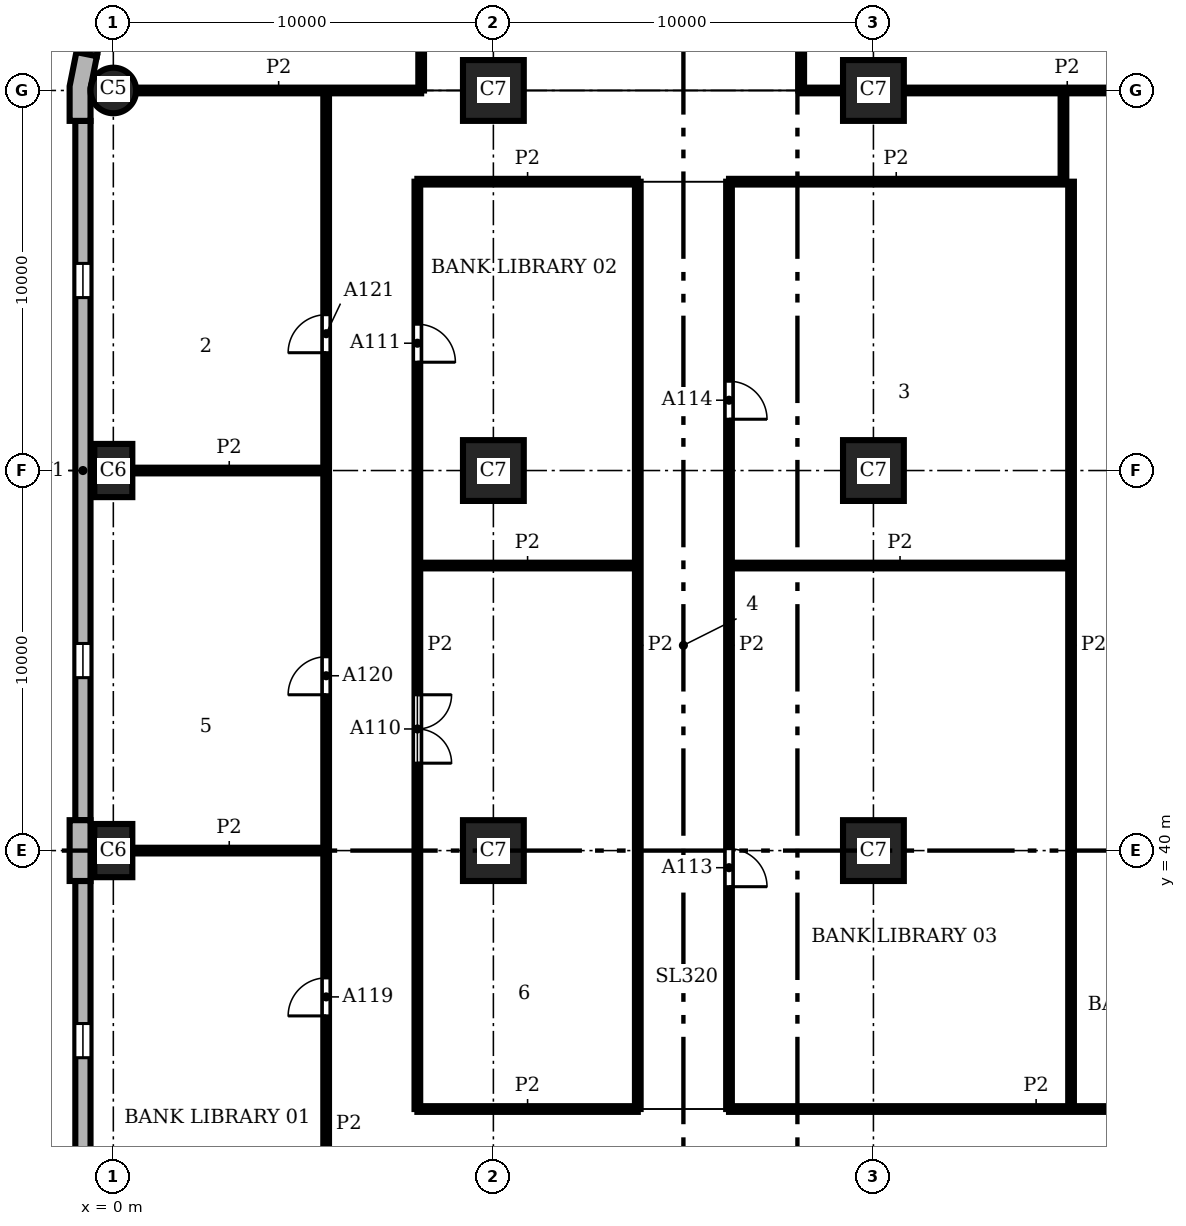
"""IFC4 building model, lengths in metres.
Left out: names, types, materials, properties, quantities, classifications, styles, units other than length and angle.
Written with IfcOpenShell. Run it as: python <this file> out.ifc"""

import sys

from ifc_helpers import new_model, si_unit, direction, frame, frame_2d, origin, origin_2d, place, context, subcontext, project, spatial, polyline, rectangle, circle, outline, extrude, element, fill, save


model = new_model("IFC4")
c1 = context("Model", 3, precision=1e-05, world=origin(), true_north=direction((0.0, 1.0)))
c2 = subcontext(c1, "Body", "Model", "MODEL_VIEW")
j1 = project(units=[si_unit("LENGTHUNIT", "METRE"), si_unit("PLANEANGLEUNIT", "RADIAN")], contexts=[c1])
p1 = place(None, origin())
s1 = spatial("IfcSite", under=j1, at=p1, CompositionType="ELEMENT")
p2 = place(p1, origin())
s2 = spatial("IfcBuilding", under=s1, at=p2, CompositionType="ELEMENT")
p3 = place(p2, frame((0.0, 0.0, 12.0)))
s3 = spatial("IfcBuildingStorey", under=s2, at=p3, CompositionType="ELEMENT", Elevation=12.0)
p4 = place(p3, frame((0.0, 60.0, 0.0), z_axis=(0.0, 0.0, 1.0), x_axis=(1.0, 0.0, 0.0)))
e1 = element("IfcColumn", 1, at=p4, inside=s3, PredefinedType="COLUMN", context=c2, shape_type="SweptSolid", body=[
    extrude(circle(Radius=0.6, at=origin_2d()), origin(), (0.0, 0.0, 1.0), 3.9),
])
for number, where, z_axis, x_axis in (
    (2, (0.0, 50.0, 0.0), (0.0, 0.0, 1.0), (0.0, 1.0, 0.0)),
    (3, (0.0, 40.0, 0.0), (0.0, 0.0, 1.0), (0.0, 1.0, 0.0)),
):
    element("IfcColumn", number, at=place(p3, frame(where, z_axis=z_axis, x_axis=x_axis)), inside=s3, PredefinedType="COLUMN", context=c2, shape_type="SweptSolid", body=[
        extrude(rectangle(XDim=1.4, YDim=1.0, at=origin_2d()), origin(), (0.0, 0.0, 1.0), 3.9),
    ])
for number, where, z_axis, x_axis in (
    (4, (10.0, 40.0, 0.0), (0.0, 0.0, 1.0), (1.0, 0.0, 0.0)),
    (5, (10.0, 50.0, 0.0), (0.0, 0.0, 1.0), (1.0, 0.0, 0.0)),
    (6, (10.0, 60.0, 0.0), (0.0, 0.0, 1.0), (1.0, 0.0, 0.0)),
    (7, (20.0, 40.0, 0.0), (0.0, 0.0, 1.0), (1.0, 0.0, 0.0)),
    (8, (20.0, 50.0, 0.0), (0.0, 0.0, 1.0), (1.0, 0.0, 0.0)),
    (9, (20.0, 60.0, 0.0), (0.0, 0.0, 1.0), (1.0, 0.0, 0.0)),
):
    element("IfcColumn", number, at=place(p3, frame(where, z_axis=z_axis, x_axis=x_axis)), inside=s3, PredefinedType="COLUMN", context=c2, shape_type="SweptSolid", body=[
        extrude(rectangle(XDim=1.6, YDim=1.6, at=origin_2d()), origin(), (0.0, 0.0, 1.0), 3.9),
    ])
p5 = place(p3, origin())
e10 = element("IfcWall", 10, at=p5, inside=s3, PredefinedType="SOLIDWALL", context=c2, shape_type="SweptSolid", body=[
    extrude(outline(polyline([(-0.825, 60.98), (-0.972, 61.009), (-1.15, 60.113), (-1.15, 59.2), (-1.0, 59.2), (-0.6, 59.2), (-0.6, 60.059), (-0.432, 60.902), (-0.825, 60.98)])), origin(), (0.0, 0.0, 1.0), 3.9),
])
e11 = element("IfcWall", 11, at=p5, inside=s3, PredefinedType="SOLIDWALL", context=c2, shape_type="SweptSolid", body=[
    extrude(outline(polyline([(-1.0, 40.8), (-1.15, 40.8), (-1.15, 40.0), (-1.15, 39.2), (-1.0, 39.2), (-0.6, 39.2), (-0.6, 40.0), (-0.6, 40.8), (-1.0, 40.8)])), origin(), (0.0, 0.0, 1.0), 3.9),
])
p6 = place(p3, frame((0.299, 65.602, 0.0), z_axis=(0.0, 0.0, 1.0), x_axis=(-0.195098533057, -0.98078364709, 0.0)))
e12 = element("IfcWall", 12, at=p6, inside=s3, PredefinedType="SOLIDWALL", context=c2, shape_type="SweptSolid", body=[
    extrude(rectangle(XDim=4.753, YDim=0.4, at=frame_2d((2.376, 0.0))), origin(), (0.0, 0.0, 1.0), 3.9),
])
p7 = place(p6, frame((0.226, 0.0, 0.9)))
e13 = element("IfcOpeningElement", 13, at=p7, cuts=e12, PredefinedType="OPENING", context=c2, shape_type="SweptSolid", body=[
    extrude(rectangle(XDim=4.3, YDim=2.35, at=frame_2d((2.15, 1.175))), frame((0.0, 0.21, 0.0), z_axis=(0.0, -1.0, 0.0), x_axis=(1.0, 0.0, 0.0)), (0.0, 0.0, 1.0), 0.42),
])
p8 = place(p3, frame((-0.8, 59.2, 0.0), z_axis=(0.0, 0.0, 1.0), x_axis=(0.0, -1.0, 0.0)))
e14 = element("IfcWall", 14, at=p8, inside=s3, PredefinedType="SOLIDWALL", context=c2, shape_type="SweptSolid", body=[
    extrude(rectangle(XDim=18.4, YDim=0.4, at=frame_2d((9.2, 0.0))), origin(), (0.0, 0.0, 1.0), 3.9),
])
p9 = place(p8, frame((3.75, 0.0, 0.9)))
e15 = element("IfcOpeningElement", 15, at=p9, cuts=e14, PredefinedType="OPENING", context=c2, shape_type="SweptSolid", body=[
    extrude(rectangle(XDim=0.9, YDim=2.35, at=frame_2d((0.45, 1.175))), frame((0.0, 0.21, 0.0), z_axis=(0.0, -1.0, 0.0), x_axis=(1.0, 0.0, 0.0)), (0.0, 0.0, 1.0), 0.42),
])
p10 = place(p8, frame((13.75, 0.0, 0.9)))
e16 = element("IfcOpeningElement", 16, at=p10, cuts=e14, PredefinedType="OPENING", context=c2, shape_type="SweptSolid", body=[
    extrude(rectangle(XDim=0.9, YDim=2.35, at=frame_2d((0.45, 1.175))), frame((0.0, 0.21, 0.0), z_axis=(0.0, -1.0, 0.0), x_axis=(1.0, 0.0, 0.0)), (0.0, 0.0, 1.0), 0.42),
])
p11 = place(p3, frame((-0.8, 39.2, 0.0), z_axis=(0.0, 0.0, 1.0), x_axis=(0.0, -1.0, 0.0)))
e17 = element("IfcWall", 17, at=p11, inside=s3, PredefinedType="SOLIDWALL", context=c2, shape_type="SweptSolid", body=[
    extrude(rectangle(XDim=18.4, YDim=0.4, at=frame_2d((9.2, 0.0))), origin(), (0.0, 0.0, 1.0), 3.9),
])
p12 = place(p11, frame((3.75, 0.0, 0.9)))
e18 = element("IfcOpeningElement", 18, at=p12, cuts=e17, PredefinedType="OPENING", context=c2, shape_type="SweptSolid", body=[
    extrude(rectangle(XDim=0.9, YDim=2.35, at=frame_2d((0.45, 1.175))), frame((0.0, 0.21, 0.0), z_axis=(0.0, -1.0, 0.0), x_axis=(1.0, 0.0, 0.0)), (0.0, 0.0, 1.0), 0.42),
])
p13 = place(p11, frame((13.75, 0.0, 0.9)))
e19 = element("IfcOpeningElement", 19, at=p13, cuts=e17, PredefinedType="OPENING", context=c2, shape_type="SweptSolid", body=[
    extrude(rectangle(XDim=0.9, YDim=2.35, at=frame_2d((0.45, 1.175))), frame((0.0, 0.21, 0.0), z_axis=(0.0, -1.0, 0.0), x_axis=(1.0, 0.0, 0.0)), (0.0, 0.0, 1.0), 0.42),
])
p14 = place(p3, frame((5.6, 5.6, 0.0), z_axis=(0.0, 0.0, 1.0), x_axis=(0.0, 1.0, 0.0)))
e20 = element("IfcWall", 20, at=p14, inside=s3, PredefinedType="PARTITIONING", context=c2, shape_type="SweptSolid", body=[
    extrude(rectangle(XDim=54.4, YDim=0.15, at=frame_2d((27.2, 0.0))), origin(), (0.0, 0.0, 1.0), 3.58),
])
p15 = place(p14, frame((6.25, 0.0, 0.0)))
e21 = element("IfcOpeningElement", 21, at=p15, cuts=e20, PredefinedType="OPENING", context=c2, shape_type="SweptSolid", body=[
    extrude(rectangle(XDim=0.8, YDim=2.1, at=frame_2d((0.4, 1.05))), frame((0.0, 0.085, 0.0), z_axis=(0.0, -1.0, 0.0), x_axis=(1.0, 0.0, 0.0)), (0.0, 0.0, 1.0), 0.17),
])
p16 = place(p14, frame((11.25, 0.0, 0.0)))
e22 = element("IfcOpeningElement", 22, at=p16, cuts=e20, PredefinedType="OPENING", context=c2, shape_type="SweptSolid", body=[
    extrude(rectangle(XDim=1.1, YDim=2.1, at=frame_2d((0.55, 1.05))), frame((0.0, 0.085, 0.0), z_axis=(0.0, -1.0, 0.0), x_axis=(1.0, 0.0, 0.0)), (0.0, 0.0, 1.0), 0.17),
])
p17 = place(p14, frame((20.0, 0.0, 0.0)))
e23 = element("IfcOpeningElement", 23, at=p17, cuts=e20, PredefinedType="OPENING", context=c2, shape_type="SweptSolid", body=[
    extrude(rectangle(XDim=1.0, YDim=2.1, at=frame_2d((0.5, 1.05))), frame((0.0, 0.085, 0.0), z_axis=(0.0, -1.0, 0.0), x_axis=(1.0, 0.0, 0.0)), (0.0, 0.0, 1.0), 0.17),
])
p18 = place(p14, frame((30.05, 0.0, 0.0)))
e24 = element("IfcOpeningElement", 24, at=p18, cuts=e20, PredefinedType="OPENING", context=c2, shape_type="SweptSolid", body=[
    extrude(rectangle(XDim=1.0, YDim=2.1, at=frame_2d((0.5, 1.05))), frame((0.0, 0.085, 0.0), z_axis=(0.0, -1.0, 0.0), x_axis=(1.0, 0.0, 0.0)), (0.0, 0.0, 1.0), 0.17),
])
p19 = place(p14, frame((38.5, 0.0, 0.0)))
e25 = element("IfcOpeningElement", 25, at=p19, cuts=e20, PredefinedType="OPENING", context=c2, shape_type="SweptSolid", body=[
    extrude(rectangle(XDim=1.0, YDim=2.1, at=frame_2d((0.5, 1.05))), frame((0.0, 0.085, 0.0), z_axis=(0.0, -1.0, 0.0), x_axis=(1.0, 0.0, 0.0)), (0.0, 0.0, 1.0), 0.17),
])
p20 = place(p14, frame((47.5, 0.0, 0.0)))
e26 = element("IfcOpeningElement", 26, at=p20, cuts=e20, PredefinedType="OPENING", context=c2, shape_type="SweptSolid", body=[
    extrude(rectangle(XDim=1.0, YDim=2.1, at=frame_2d((0.5, 1.05))), frame((0.0, 0.085, 0.0), z_axis=(0.0, -1.0, 0.0), x_axis=(1.0, 0.0, 0.0)), (0.0, 0.0, 1.0), 0.17),
])
p21 = place(p3, frame((8.0, 33.2, 0.0), z_axis=(0.0, 0.0, 1.0), x_axis=(0.0, 1.0, 0.0)))
e27 = element("IfcWall", 27, at=p21, inside=s3, PredefinedType="PARTITIONING", context=c2, shape_type="SweptSolid", body=[
    extrude(rectangle(XDim=24.4, YDim=0.15, at=frame_2d((12.2, 0.0))), origin(), (0.0, 0.0, 1.0), 3.58),
])
p22 = place(p21, frame((9.1, 0.0, 0.0)))
e28 = element("IfcOpeningElement", 28, at=p22, cuts=e27, PredefinedType="OPENING", context=c2, shape_type="SweptSolid", body=[
    extrude(rectangle(XDim=1.8, YDim=2.1, at=frame_2d((0.9, 1.05))), frame((0.0, 0.085, 0.0), z_axis=(0.0, -1.0, 0.0), x_axis=(1.0, 0.0, 0.0)), (0.0, 0.0, 1.0), 0.17),
])
p23 = place(p21, frame((19.65, 0.0, 0.0)))
e29 = element("IfcOpeningElement", 29, at=p23, cuts=e27, PredefinedType="OPENING", context=c2, shape_type="SweptSolid", body=[
    extrude(rectangle(XDim=1.0, YDim=2.1, at=frame_2d((0.5, 1.05))), frame((0.0, 0.085, 0.0), z_axis=(0.0, -1.0, 0.0), x_axis=(1.0, 0.0, 0.0)), (0.0, 0.0, 1.0), 0.17),
])
p24 = place(p3, frame((8.1, 60.0, 0.0), z_axis=(0.0, 0.0, 1.0), x_axis=(0.0, 1.0, 0.0)))
e30 = element("IfcWall", 30, at=p24, inside=s3, PredefinedType="PARTITIONING", context=c2, shape_type="SweptSolid", body=[
    extrude(rectangle(XDim=6.4, YDim=0.15, at=frame_2d((3.2, 0.0))), origin(), (0.0, 0.0, 1.0), 3.58),
])
p25 = place(p24, frame((2.35, 0.0, 0.0)))
e31 = element("IfcOpeningElement", 31, at=p25, cuts=e30, PredefinedType="OPENING", context=c2, shape_type="SweptSolid", body=[
    extrude(rectangle(XDim=1.0, YDim=2.1, at=frame_2d((0.5, 1.05))), frame((0.0, 0.085, 0.0), z_axis=(0.0, -1.0, 0.0), x_axis=(1.0, 0.0, 0.0)), (0.0, 0.0, 1.0), 0.17),
])
p26 = place(p3, frame((13.8, 33.2, 0.0), z_axis=(0.0, 0.0, 1.0), x_axis=(0.0, 1.0, 0.0)))
e32 = element("IfcWall", 32, at=p26, inside=s3, PredefinedType="PARTITIONING", context=c2, shape_type="SweptSolid", body=[
    extrude(rectangle(XDim=24.4, YDim=0.15, at=frame_2d((12.2, 0.0))), origin(), (0.0, 0.0, 1.0), 3.58),
])
p27 = place(p3, frame((16.2, 33.2, 0.0), z_axis=(0.0, 0.0, 1.0), x_axis=(0.0, 1.0, 0.0)))
e33 = element("IfcWall", 33, at=p27, inside=s3, PredefinedType="PARTITIONING", context=c2, shape_type="SweptSolid", body=[
    extrude(rectangle(XDim=24.4, YDim=0.15, at=frame_2d((12.2, 0.0))), origin(), (0.0, 0.0, 1.0), 3.58),
])
p28 = place(p27, frame((5.85, 0.0, 0.0)))
e34 = element("IfcOpeningElement", 34, at=p28, cuts=e33, PredefinedType="OPENING", context=c2, shape_type="SweptSolid", body=[
    extrude(rectangle(XDim=1.0, YDim=2.1, at=frame_2d((0.5, 1.05))), frame((0.0, 0.085, 0.0), z_axis=(0.0, -1.0, 0.0), x_axis=(1.0, 0.0, 0.0)), (0.0, 0.0, 1.0), 0.17),
])
p29 = place(p27, frame((18.15, 0.0, 0.0)))
e35 = element("IfcOpeningElement", 35, at=p29, cuts=e33, PredefinedType="OPENING", context=c2, shape_type="SweptSolid", body=[
    extrude(rectangle(XDim=1.0, YDim=2.1, at=frame_2d((0.5, 1.05))), frame((0.0, 0.085, 0.0), z_axis=(0.0, -1.0, 0.0), x_axis=(1.0, 0.0, 0.0)), (0.0, 0.0, 1.0), 0.17),
])
p30 = place(p3, frame((18.1, 60.0, 0.0), z_axis=(0.0, 0.0, 1.0), x_axis=(0.0, 1.0, 0.0)))
e36 = element("IfcWall", 36, at=p30, inside=s3, PredefinedType="PARTITIONING", context=c2, shape_type="SweptSolid", body=[
    extrude(rectangle(XDim=6.4, YDim=0.15, at=frame_2d((3.2, 0.0))), origin(), (0.0, 0.0, 1.0), 3.58),
])
p31 = place(p30, frame((2.6, 0.0, 0.0)))
e37 = element("IfcOpeningElement", 37, at=p31, cuts=e36, PredefinedType="OPENING", context=c2, shape_type="SweptSolid", body=[
    extrude(rectangle(XDim=1.8, YDim=2.1, at=frame_2d((0.9, 1.05))), frame((0.0, 0.085, 0.0), z_axis=(0.0, -1.0, 0.0), x_axis=(1.0, 0.0, 0.0)), (0.0, 0.0, 1.0), 0.17),
])
p32 = place(p3, frame((25.0, 57.6, 0.0), z_axis=(0.0, 0.0, 1.0), x_axis=(0.0, 1.0, 0.0)))
e38 = element("IfcWall", 38, at=p32, inside=s3, PredefinedType="PARTITIONING", context=c2, shape_type="SweptSolid", body=[
    extrude(rectangle(XDim=2.4, YDim=0.15, at=frame_2d((1.2, 0.0))), origin(), (0.0, 0.0, 1.0), 3.58),
])
p33 = place(p3, frame((25.2, 33.2, 0.0), z_axis=(0.0, 0.0, 1.0), x_axis=(0.0, 1.0, 0.0)))
e39 = element("IfcWall", 39, at=p33, inside=s3, PredefinedType="PARTITIONING", context=c2, shape_type="SweptSolid", body=[
    extrude(rectangle(XDim=24.4, YDim=0.15, at=frame_2d((12.2, 0.0))), origin(), (0.0, 0.0, 1.0), 3.58),
])
p34 = place(p3, frame((8.0, 33.2, 0.0), z_axis=(0.0, 0.0, 1.0), x_axis=(1.0, 0.0, 0.0)))
e40 = element("IfcWall", 40, at=p34, inside=s3, PredefinedType="PARTITIONING", context=c2, shape_type="SweptSolid", body=[
    extrude(rectangle(XDim=5.8, YDim=0.15, at=frame_2d((2.9, 0.0))), origin(), (0.0, 0.0, 1.0), 3.58),
])
p35 = place(p3, frame((16.2, 33.2, 0.0), z_axis=(0.0, 0.0, 1.0), x_axis=(1.0, 0.0, 0.0)))
e41 = element("IfcWall", 41, at=p35, inside=s3, PredefinedType="PARTITIONING", context=c2, shape_type="SweptSolid", body=[
    extrude(rectangle(XDim=16.162, YDim=0.15, at=frame_2d((8.081, 0.0))), origin(), (0.0, 0.0, 1.0), 3.58),
])
p36 = place(p35, frame((11.6, 0.0, 0.0)))
e42 = element("IfcOpeningElement", 42, at=p36, cuts=e41, PredefinedType="OPENING", context=c2, shape_type="SweptSolid", body=[
    extrude(rectangle(XDim=1.0, YDim=2.1, at=frame_2d((0.5, 1.05))), frame((0.0, 0.085, 0.0), z_axis=(0.0, -1.0, 0.0), x_axis=(1.0, 0.0, 0.0)), (0.0, 0.0, 1.0), 0.17),
])
p37 = place(p3, frame((0.5, 40.0, 0.0), z_axis=(0.0, 0.0, 1.0), x_axis=(1.0, 0.0, 0.0)))
e43 = element("IfcWall", 43, at=p37, inside=s3, PredefinedType="PARTITIONING", context=c2, shape_type="SweptSolid", body=[
    extrude(rectangle(XDim=5.1, YDim=0.15, at=frame_2d((2.55, 0.0))), origin(), (0.0, 0.0, 1.0), 3.58),
])
p38 = place(p3, frame((8.0, 47.5, 0.0), z_axis=(0.0, 0.0, 1.0), x_axis=(1.0, 0.0, 0.0)))
e44 = element("IfcWall", 44, at=p38, inside=s3, PredefinedType="PARTITIONING", context=c2, shape_type="SweptSolid", body=[
    extrude(rectangle(XDim=5.8, YDim=0.15, at=frame_2d((2.9, 0.0))), origin(), (0.0, 0.0, 1.0), 3.58),
])
p39 = place(p3, frame((16.2, 47.5, 0.0), z_axis=(0.0, 0.0, 1.0), x_axis=(1.0, 0.0, 0.0)))
e45 = element("IfcWall", 45, at=p39, inside=s3, PredefinedType="PARTITIONING", context=c2, shape_type="SweptSolid", body=[
    extrude(rectangle(XDim=9.0, YDim=0.15, at=frame_2d((4.5, 0.0))), origin(), (0.0, 0.0, 1.0), 3.58),
])
p40 = place(p3, frame((0.5, 50.0, 0.0), z_axis=(0.0, 0.0, 1.0), x_axis=(1.0, 0.0, 0.0)))
e46 = element("IfcWall", 46, at=p40, inside=s3, PredefinedType="PARTITIONING", context=c2, shape_type="SweptSolid", body=[
    extrude(rectangle(XDim=5.1, YDim=0.15, at=frame_2d((2.55, 0.0))), origin(), (0.0, 0.0, 1.0), 3.58),
])
p41 = place(p3, frame((8.0, 57.6, 0.0), z_axis=(0.0, 0.0, 1.0), x_axis=(1.0, 0.0, 0.0)))
e47 = element("IfcWall", 47, at=p41, inside=s3, PredefinedType="PARTITIONING", context=c2, shape_type="SweptSolid", body=[
    extrude(rectangle(XDim=5.8, YDim=0.15, at=frame_2d((2.9, 0.0))), origin(), (0.0, 0.0, 1.0), 3.58),
])
p42 = place(p3, frame((16.2, 57.6, 0.0), z_axis=(0.0, 0.0, 1.0), x_axis=(1.0, 0.0, 0.0)))
e48 = element("IfcWall", 48, at=p42, inside=s3, PredefinedType="PARTITIONING", context=c2, shape_type="SweptSolid", body=[
    extrude(rectangle(XDim=8.8, YDim=0.15, at=frame_2d((4.4, 0.0))), origin(), (0.0, 0.0, 1.0), 3.58),
])
p43 = place(p3, frame((0.6, 60.0, 0.0), z_axis=(0.0, 0.0, 1.0), x_axis=(1.0, 0.0, 0.0)))
e49 = element("IfcWall", 49, at=p43, inside=s3, PredefinedType="PARTITIONING", context=c2, shape_type="SweptSolid", body=[
    extrude(rectangle(XDim=7.5, YDim=0.15, at=frame_2d((3.75, 0.0))), origin(), (0.0, 0.0, 1.0), 3.58),
])
p44 = place(p3, frame((18.1, 60.0, 0.0), z_axis=(0.0, 0.0, 1.0), x_axis=(1.0, 0.0, 0.0)))
e50 = element("IfcWall", 50, at=p44, inside=s3, PredefinedType="PARTITIONING", context=c2, shape_type="SweptSolid", body=[
    extrude(rectangle(XDim=1.1, YDim=0.15, at=frame_2d((0.55, 0.0))), origin(), (0.0, 0.0, 1.0), 3.58),
])
p45 = place(p3, frame((20.8, 60.0, 0.0), z_axis=(0.0, 0.0, 1.0), x_axis=(1.0, 0.0, 0.0)))
e51 = element("IfcWall", 51, at=p45, inside=s3, PredefinedType="PARTITIONING", context=c2, shape_type="SweptSolid", body=[
    extrude(rectangle(XDim=8.6, YDim=0.15, at=frame_2d((4.3, 0.0))), origin(), (0.0, 0.0, 1.0), 3.58),
])
p46 = place(p9, origin())
e52 = element("IfcWindow", 52, at=p46, inside=s3, PartitioningType="SINGLE_PANEL", PredefinedType="WINDOW", context=c2, shape_type="SweptSolid", body=[
    extrude(rectangle(XDim=0.9, YDim=2.35, at=frame_2d((0.45, 1.175))), frame((0.0, 0.16, 0.0), z_axis=(0.0, -1.0, 0.0), x_axis=(1.0, 0.0, 0.0)), (0.0, 0.0, 1.0), 0.06),
])
fill(e15, e52)
p47 = place(p10, origin())
e53 = element("IfcWindow", 53, at=p47, inside=s3, PartitioningType="SINGLE_PANEL", PredefinedType="WINDOW", context=c2, shape_type="SweptSolid", body=[
    extrude(rectangle(XDim=0.9, YDim=2.35, at=frame_2d((0.45, 1.175))), frame((0.0, 0.16, 0.0), z_axis=(0.0, -1.0, 0.0), x_axis=(1.0, 0.0, 0.0)), (0.0, 0.0, 1.0), 0.06),
])
fill(e16, e53)
p48 = place(p12, origin())
e54 = element("IfcWindow", 54, at=p48, inside=s3, PartitioningType="SINGLE_PANEL", PredefinedType="WINDOW", context=c2, shape_type="SweptSolid", body=[
    extrude(rectangle(XDim=0.9, YDim=2.35, at=frame_2d((0.45, 1.175))), frame((0.0, 0.16, 0.0), z_axis=(0.0, -1.0, 0.0), x_axis=(1.0, 0.0, 0.0)), (0.0, 0.0, 1.0), 0.06),
])
fill(e18, e54)
p49 = place(p22, frame((1.8, 0.0, 0.0), z_axis=(0.0, 0.0, 1.0), x_axis=(-1.0, 0.0, 0.0)))
e55 = element("IfcDoor", 55, at=p49, inside=s3, OperationType="DOUBLE_DOOR_SINGLE_SWING", PredefinedType="DOOR", context=c2, shape_type="SweptSolid", body=[
    extrude(rectangle(XDim=1.8, YDim=2.1, at=frame_2d((0.9, 1.05))), frame((0.0, 0.025, 0.0), z_axis=(0.0, -1.0, 0.0), x_axis=(1.0, 0.0, 0.0)), (0.0, 0.0, 1.0), 0.05),
])
fill(e28, e55)
p50 = place(p23, frame((1.0, 0.0, 0.0), z_axis=(0.0, 0.0, 1.0), x_axis=(-1.0, 0.0, 0.0)))
e56 = element("IfcDoor", 56, at=p50, inside=s3, OperationType="SINGLE_SWING_RIGHT", PredefinedType="DOOR", context=c2, shape_type="SweptSolid", body=[
    extrude(rectangle(XDim=1.0, YDim=2.1, at=frame_2d((0.5, 1.05))), frame((0.0, 0.025, 0.0), z_axis=(0.0, -1.0, 0.0), x_axis=(1.0, 0.0, 0.0)), (0.0, 0.0, 1.0), 0.05),
])
fill(e29, e56)
p51 = place(p28, frame((1.0, 0.0, 0.0), z_axis=(0.0, 0.0, 1.0), x_axis=(-1.0, 0.0, 0.0)))
e57 = element("IfcDoor", 57, at=p51, inside=s3, OperationType="SINGLE_SWING_RIGHT", PredefinedType="DOOR", context=c2, shape_type="SweptSolid", body=[
    extrude(rectangle(XDim=1.0, YDim=2.1, at=frame_2d((0.5, 1.05))), frame((0.0, 0.025, 0.0), z_axis=(0.0, -1.0, 0.0), x_axis=(1.0, 0.0, 0.0)), (0.0, 0.0, 1.0), 0.05),
])
fill(e34, e57)
p52 = place(p29, frame((1.0, 0.0, 0.0), z_axis=(0.0, 0.0, 1.0), x_axis=(-1.0, 0.0, 0.0)))
e58 = element("IfcDoor", 58, at=p52, inside=s3, OperationType="SINGLE_SWING_RIGHT", PredefinedType="DOOR", context=c2, shape_type="SweptSolid", body=[
    extrude(rectangle(XDim=1.0, YDim=2.1, at=frame_2d((0.5, 1.05))), frame((0.0, 0.025, 0.0), z_axis=(0.0, -1.0, 0.0), x_axis=(1.0, 0.0, 0.0)), (0.0, 0.0, 1.0), 0.05),
])
fill(e35, e58)
p53 = place(p18, origin())
e59 = element("IfcDoor", 59, at=p53, inside=s3, OperationType="SINGLE_SWING_LEFT", PredefinedType="DOOR", context=c2, shape_type="SweptSolid", body=[
    extrude(rectangle(XDim=1.0, YDim=2.1, at=frame_2d((0.5, 1.05))), frame((0.0, 0.025, 0.0), z_axis=(0.0, -1.0, 0.0), x_axis=(1.0, 0.0, 0.0)), (0.0, 0.0, 1.0), 0.05),
])
fill(e24, e59)
p54 = place(p19, origin())
e60 = element("IfcDoor", 60, at=p54, inside=s3, OperationType="SINGLE_SWING_LEFT", PredefinedType="DOOR", context=c2, shape_type="SweptSolid", body=[
    extrude(rectangle(XDim=1.0, YDim=2.1, at=frame_2d((0.5, 1.05))), frame((0.0, 0.025, 0.0), z_axis=(0.0, -1.0, 0.0), x_axis=(1.0, 0.0, 0.0)), (0.0, 0.0, 1.0), 0.05),
])
fill(e25, e60)
p55 = place(p20, origin())
e61 = element("IfcDoor", 61, at=p55, inside=s3, OperationType="SINGLE_SWING_LEFT", PredefinedType="DOOR", context=c2, shape_type="SweptSolid", body=[
    extrude(rectangle(XDim=1.0, YDim=2.1, at=frame_2d((0.5, 1.05))), frame((0.0, 0.025, 0.0), z_axis=(0.0, -1.0, 0.0), x_axis=(1.0, 0.0, 0.0)), (0.0, 0.0, 1.0), 0.05),
])
fill(e26, e61)
save(model, sys.argv[1])
